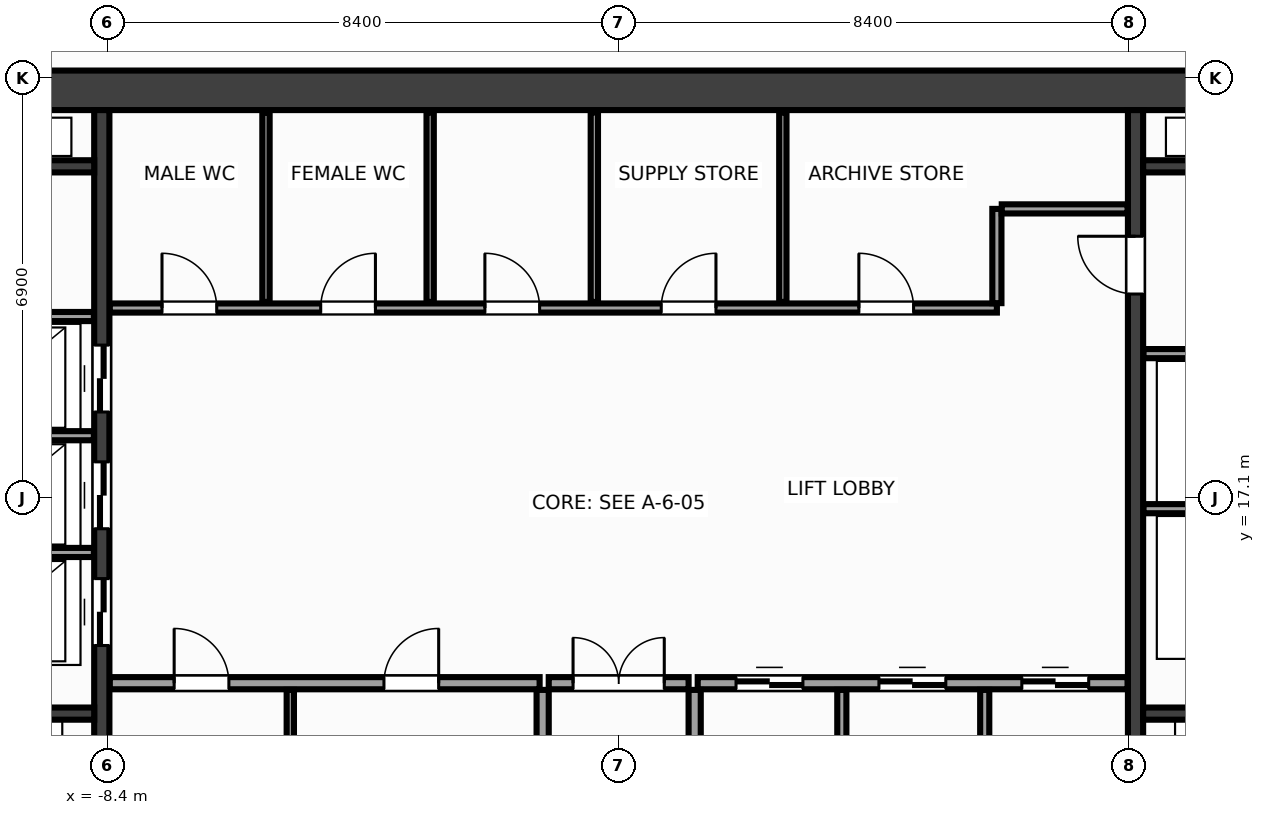
"""IFC4 building model, lengths in metres.
Left out: names, types, materials, properties, quantities, classifications, styles, units other than length and angle.
Written with IfcOpenShell. Run it as: python <this file> out.ifc"""

import sys

from ifc_helpers import new_model, si_unit, direction, frame, frame_2d, origin, place, context, subcontext, project, spatial, rectangle, extrude, source, transform, mapped, element, fill, save


model = new_model("IFC4")
c1 = context("Model", 3, precision=1e-05, world=origin(), true_north=direction((0.0, 1.0)))
c2 = subcontext(c1, "Body", "Model", "MODEL_VIEW")
j1 = project(units=[si_unit("LENGTHUNIT", "METRE"), si_unit("PLANEANGLEUNIT", "RADIAN")], contexts=[c1])
p1 = place(None, origin())
s1 = spatial("IfcSite", under=j1, at=p1, CompositionType="ELEMENT")
p2 = place(p1, origin())
s2 = spatial("IfcBuilding", under=s1, at=p2, CompositionType="ELEMENT")
p3 = place(p2, frame((0.0, 0.0, 135.2)))
s3 = spatial("IfcBuildingStorey", under=s2, at=p3, CompositionType="ELEMENT", Elevation=135.2)
m1 = source(origin(), c2, "Body", "SweptSolid", [
    extrude(rectangle(XDim=31.85, YDim=0.65, at=frame_2d((15.925, 0.0))), origin(), (0.0, 0.0, 1.0), 3.6),
])
p4 = place(p3, frame((-15.925, 23.8, 0.0), z_axis=(0.0, 0.0, 1.0), x_axis=(1.0, 0.0, 0.0)))
e1 = element("IfcWall", 1, at=p4, inside=s3, PredefinedType="SHEAR", context=c2, shape_type="MappedRepresentation", body=[
    mapped(m1, transform((0.0, 0.0, 0.0), x_axis=(1.0, 0.0, 0.0), y_axis=(0.0, 1.0, 0.0), z_axis=(0.0, 0.0, 1.0), scale=1.0)),
])
m2 = source(origin(), c2, "Body", "SweptSolid", [
    extrude(rectangle(XDim=12.95, YDim=0.25, at=frame_2d((6.475, 0.0))), origin(), (0.0, 0.0, 1.0), 3.6),
])
p5 = place(p3, frame((-8.5, 10.525, 0.0), z_axis=(0.0, 0.0, 1.0), x_axis=(0.0, 1.0, 0.0)))
e2 = element("IfcWall", 2, at=p5, inside=s3, PredefinedType="SHEAR", context=c2, shape_type="MappedRepresentation", body=[
    mapped(m2, transform((0.0, 0.0, 0.0), x_axis=(1.0, 0.0, 0.0), y_axis=(0.0, 1.0, 0.0), z_axis=(0.0, 0.0, 1.0), scale=1.0)),
])
p6 = place(p5, frame((4.145, 0.0, 0.0)))
e3 = element("IfcOpeningElement", 3, at=p6, cuts=e2, PredefinedType="OPENING", context=c2, shape_type="SweptSolid", body=[
    extrude(rectangle(XDim=1.1, YDim=2.15, at=frame_2d((0.55, 1.075))), frame((0.0, 0.137, 0.0), z_axis=(0.0, -1.0, 0.0), x_axis=(1.0, 0.0, 0.0)), (0.0, 0.0, 1.0), 0.274),
])
p7 = place(p5, frame((6.065, 0.0, 0.0)))
e4 = element("IfcOpeningElement", 4, at=p7, cuts=e2, PredefinedType="OPENING", context=c2, shape_type="SweptSolid", body=[
    extrude(rectangle(XDim=1.1, YDim=2.15, at=frame_2d((0.55, 1.075))), frame((0.0, 0.137, 0.0), z_axis=(0.0, -1.0, 0.0), x_axis=(1.0, 0.0, 0.0)), (0.0, 0.0, 1.0), 0.274),
])
p8 = place(p5, frame((7.985, 0.0, 0.0)))
e5 = element("IfcOpeningElement", 5, at=p8, cuts=e2, PredefinedType="OPENING", context=c2, shape_type="SweptSolid", body=[
    extrude(rectangle(XDim=1.1, YDim=2.15, at=frame_2d((0.55, 1.075))), frame((0.0, 0.137, 0.0), z_axis=(0.0, -1.0, 0.0), x_axis=(1.0, 0.0, 0.0)), (0.0, 0.0, 1.0), 0.274),
])
p9 = place(p3, frame((8.5, 10.525, 0.0), z_axis=(0.0, 0.0, 1.0), x_axis=(0.0, 1.0, 0.0)))
e6 = element("IfcWall", 6, at=p9, inside=s3, PredefinedType="SHEAR", context=c2, shape_type="MappedRepresentation", body=[
    mapped(m2, transform((0.0, 0.0, 0.0), x_axis=(1.0, 0.0, 0.0), y_axis=(0.0, 1.0, 0.0), z_axis=(0.0, 0.0, 1.0), scale=1.0)),
])
p10 = place(p9, frame((9.925, 0.0, 0.0)))
e7 = element("IfcOpeningElement", 7, at=p10, cuts=e6, PredefinedType="OPENING", context=c2, shape_type="SweptSolid", body=[
    extrude(rectangle(XDim=0.95, YDim=2.15, at=frame_2d((0.475, 1.075))), frame((0.0, 0.137, 0.0), z_axis=(0.0, -1.0, 0.0), x_axis=(1.0, 0.0, 0.0)), (0.0, 0.0, 1.0), 0.274),
])
m3 = source(origin(), c2, "Body", "SweptSolid", [
    extrude(rectangle(XDim=2.825, YDim=0.2, at=frame_2d((1.413, 0.0))), origin(), (0.0, 0.0, 1.0), 3.6),
])
for number, where, z_axis, x_axis in (
    (8, (-11.45, 13.55, 0.0), (0.0, 0.0, 1.0), (1.0, 0.0, 0.0)),
    (9, (8.625, 13.55, 0.0), (0.0, 0.0, 1.0), (1.0, 0.0, 0.0)),
):
    element("IfcWall", number, at=place(p3, frame(where, z_axis=z_axis, x_axis=x_axis)), inside=s3, PredefinedType="SHEAR", context=c2, shape_type="MappedRepresentation", body=[
        mapped(m3, transform((0.0, 0.0, 0.0), x_axis=(1.0, 0.0, 0.0), y_axis=(0.0, 1.0, 0.0), z_axis=(0.0, 0.0, 1.0), scale=1.0)),
    ])
m4 = source(origin(), c2, "Body", "SweptSolid", [
    extrude(rectangle(XDim=3.02, YDim=0.2, at=frame_2d((1.51, 0.0))), origin(), (0.0, 0.0, 1.0), 3.6),
])
for number, where, z_axis, x_axis in (
    (10, (-11.645, 22.55, 0.0), (0.0, 0.0, 1.0), (1.0, 0.0, 0.0)),
    (11, (8.625, 22.55, 0.0), (0.0, 0.0, 1.0), (1.0, 0.0, 0.0)),
):
    element("IfcWall", number, at=place(p3, frame(where, z_axis=z_axis, x_axis=x_axis)), inside=s3, PredefinedType="SHEAR", context=c2, shape_type="MappedRepresentation", body=[
        mapped(m4, transform((0.0, 0.0, 0.0), x_axis=(1.0, 0.0, 0.0), y_axis=(0.0, 1.0, 0.0), z_axis=(0.0, 0.0, 1.0), scale=1.0)),
    ])
m5 = source(origin(), c2, "Body", "SweptSolid", [
    extrude(rectangle(XDim=3.01, YDim=0.15, at=frame_2d((1.505, 0.0))), origin(), (0.0, 0.0, 1.0), 3.38),
])
for number, where, z_axis, x_axis in (
    (12, (-11.64, 16.2, 0.0), (0.0, 0.0, 1.0), (1.0, 0.0, 0.0)),
    (13, (-11.64, 18.12, 0.0), (0.0, 0.0, 1.0), (1.0, 0.0, 0.0)),
    (14, (-11.64, 20.08, 0.0), (0.0, 0.0, 1.0), (1.0, 0.0, 0.0)),
    (15, (8.63, 16.92, 0.0), (0.0, 0.0, 1.0), (1.0, 0.0, 0.0)),
    (16, (8.63, 19.47, 0.0), (0.0, 0.0, 1.0), (1.0, 0.0, 0.0)),
):
    element("IfcWall", number, at=place(p3, frame(where, z_axis=z_axis, x_axis=x_axis)), inside=s3, PredefinedType="PARTITIONING", context=c2, shape_type="MappedRepresentation", body=[
        mapped(m5, transform((0.0, 0.0, 0.0), x_axis=(1.0, 0.0, 0.0), y_axis=(0.0, 1.0, 0.0), z_axis=(0.0, 0.0, 1.0), scale=1.0)),
    ])
m6 = source(origin(), c2, "Body", "SweptSolid", [
    extrude(rectangle(XDim=7.07, YDim=0.2, at=frame_2d((3.535, 0.0))), origin(), (0.0, 0.0, 1.0), 3.38),
])
p11 = place(p3, frame((-8.37, 14.05, 0.0), z_axis=(0.0, 0.0, 1.0), x_axis=(1.0, 0.0, 0.0)))
e17 = element("IfcWall", 17, at=p11, inside=s3, PredefinedType="PARTITIONING", context=c2, shape_type="MappedRepresentation", body=[
    mapped(m6, transform((0.0, 0.0, 0.0), x_axis=(1.0, 0.0, 0.0), y_axis=(0.0, 1.0, 0.0), z_axis=(0.0, 0.0, 1.0), scale=1.0)),
])
p12 = place(p11, frame((1.06, 0.0, 0.0)))
e18 = element("IfcOpeningElement", 18, at=p12, cuts=e17, PredefinedType="OPENING", context=c2, shape_type="SweptSolid", body=[
    extrude(rectangle(XDim=0.9, YDim=2.15, at=frame_2d((0.45, 1.075))), frame((0.0, 0.112, 0.0), z_axis=(0.0, -1.0, 0.0), x_axis=(1.0, 0.0, 0.0)), (0.0, 0.0, 1.0), 0.224),
])
p13 = place(p11, frame((4.51, 0.0, 0.0)))
e19 = element("IfcOpeningElement", 19, at=p13, cuts=e17, PredefinedType="OPENING", context=c2, shape_type="SweptSolid", body=[
    extrude(rectangle(XDim=0.9, YDim=2.15, at=frame_2d((0.45, 1.075))), frame((0.0, 0.112, 0.0), z_axis=(0.0, -1.0, 0.0), x_axis=(1.0, 0.0, 0.0)), (0.0, 0.0, 1.0), 0.224),
])
p14 = place(p3, frame((1.3, 14.05, 0.0), z_axis=(0.0, 0.0, 1.0), x_axis=(1.0, 0.0, 0.0)))
e20 = element("IfcWall", 20, at=p14, inside=s3, PredefinedType="PARTITIONING", context=c2, shape_type="MappedRepresentation", body=[
    mapped(m6, transform((0.0, 0.0, 0.0), x_axis=(1.0, 0.0, 0.0), y_axis=(0.0, 1.0, 0.0), z_axis=(0.0, 0.0, 1.0), scale=1.0)),
])
p15 = place(p14, frame((0.63, 0.0, 0.0)))
e21 = element("IfcOpeningElement", 21, at=p15, cuts=e20, PredefinedType="OPENING", context=c2, shape_type="SweptSolid", body=[
    extrude(rectangle(XDim=1.1, YDim=2.15, at=frame_2d((0.55, 1.075))), frame((0.0, 0.112, 0.0), z_axis=(0.0, -1.0, 0.0), x_axis=(1.0, 0.0, 0.0)), (0.0, 0.0, 1.0), 0.224),
])
p16 = place(p14, frame((2.98, 0.0, 0.0)))
e22 = element("IfcOpeningElement", 22, at=p16, cuts=e20, PredefinedType="OPENING", context=c2, shape_type="SweptSolid", body=[
    extrude(rectangle(XDim=1.1, YDim=2.15, at=frame_2d((0.55, 1.075))), frame((0.0, 0.112, 0.0), z_axis=(0.0, -1.0, 0.0), x_axis=(1.0, 0.0, 0.0)), (0.0, 0.0, 1.0), 0.224),
])
p17 = place(p14, frame((5.33, 0.0, 0.0)))
e23 = element("IfcOpeningElement", 23, at=p17, cuts=e20, PredefinedType="OPENING", context=c2, shape_type="SweptSolid", body=[
    extrude(rectangle(XDim=1.1, YDim=2.15, at=frame_2d((0.55, 1.075))), frame((0.0, 0.112, 0.0), z_axis=(0.0, -1.0, 0.0), x_axis=(1.0, 0.0, 0.0)), (0.0, 0.0, 1.0), 0.224),
])
m7 = source(origin(), c2, "Body", "SweptSolid", [
    extrude(rectangle(XDim=3.415, YDim=0.2, at=frame_2d((1.708, 0.0))), origin(), (0.0, 0.0, 1.0), 3.38),
])
for number, where, z_axis, x_axis in (
    (24, (-1.25, 10.525, 0.0), (0.0, 0.0, 1.0), (0.0, 1.0, 0.0)),
    (25, (1.25, 10.525, 0.0), (0.0, 0.0, 1.0), (0.0, 1.0, 0.0)),
):
    element("IfcWall", number, at=place(p3, frame(where, z_axis=z_axis, x_axis=x_axis)), inside=s3, PredefinedType="PARTITIONING", context=c2, shape_type="MappedRepresentation", body=[
        mapped(m7, transform((0.0, 0.0, 0.0), x_axis=(1.0, 0.0, 0.0), y_axis=(0.0, 1.0, 0.0), z_axis=(0.0, 0.0, 1.0), scale=1.0)),
    ])
m8 = source(origin(), c2, "Body", "SweptSolid", [
    extrude(rectangle(XDim=2.3, YDim=0.2, at=frame_2d((1.15, 0.0))), origin(), (0.0, 0.0, 1.0), 3.38),
])
p18 = place(p3, frame((-1.15, 14.05, 0.0), z_axis=(0.0, 0.0, 1.0), x_axis=(1.0, 0.0, 0.0)))
e26 = element("IfcWall", 26, at=p18, inside=s3, PredefinedType="PARTITIONING", context=c2, shape_type="MappedRepresentation", body=[
    mapped(m8, transform((0.0, 0.0, 0.0), x_axis=(1.0, 0.0, 0.0), y_axis=(0.0, 1.0, 0.0), z_axis=(0.0, 0.0, 1.0), scale=1.0)),
])
p19 = place(p18, frame((0.4, 0.0, 0.0)))
e27 = element("IfcOpeningElement", 27, at=p19, cuts=e26, PredefinedType="OPENING", context=c2, shape_type="SweptSolid", body=[
    extrude(rectangle(XDim=1.5, YDim=2.2, at=frame_2d((0.75, 1.1))), frame((0.0, 0.112, 0.0), z_axis=(0.0, -1.0, 0.0), x_axis=(1.0, 0.0, 0.0)), (0.0, 0.0, 1.0), 0.224),
])
m9 = source(origin(), c2, "Body", "SweptSolid", [
    extrude(rectangle(XDim=14.59, YDim=0.15, at=frame_2d((7.295, 0.0))), origin(), (0.0, 0.0, 1.0), 3.38),
])
p20 = place(p3, frame((-8.37, 20.22, 0.0), z_axis=(0.0, 0.0, 1.0), x_axis=(1.0, 0.0, 0.0)))
e28 = element("IfcWall", 28, at=p20, inside=s3, PredefinedType="PARTITIONING", context=c2, shape_type="MappedRepresentation", body=[
    mapped(m9, transform((0.0, 0.0, 0.0), x_axis=(1.0, 0.0, 0.0), y_axis=(0.0, 1.0, 0.0), z_axis=(0.0, 0.0, 1.0), scale=1.0)),
])
p21 = place(p20, frame((0.86, 0.0, 0.0)))
e29 = element("IfcOpeningElement", 29, at=p21, cuts=e28, PredefinedType="OPENING", context=c2, shape_type="SweptSolid", body=[
    extrude(rectangle(XDim=0.9, YDim=2.15, at=frame_2d((0.45, 1.075))), frame((0.0, 0.087, 0.0), z_axis=(0.0, -1.0, 0.0), x_axis=(1.0, 0.0, 0.0)), (0.0, 0.0, 1.0), 0.174),
])
p22 = place(p20, frame((3.47, 0.0, 0.0)))
e30 = element("IfcOpeningElement", 30, at=p22, cuts=e28, PredefinedType="OPENING", context=c2, shape_type="SweptSolid", body=[
    extrude(rectangle(XDim=0.9, YDim=2.15, at=frame_2d((0.45, 1.075))), frame((0.0, 0.087, 0.0), z_axis=(0.0, -1.0, 0.0), x_axis=(1.0, 0.0, 0.0)), (0.0, 0.0, 1.0), 0.174),
])
p23 = place(p20, frame((6.17, 0.0, 0.0)))
e31 = element("IfcOpeningElement", 31, at=p23, cuts=e28, PredefinedType="OPENING", context=c2, shape_type="SweptSolid", body=[
    extrude(rectangle(XDim=0.9, YDim=2.15, at=frame_2d((0.45, 1.075))), frame((0.0, 0.087, 0.0), z_axis=(0.0, -1.0, 0.0), x_axis=(1.0, 0.0, 0.0)), (0.0, 0.0, 1.0), 0.174),
])
p24 = place(p20, frame((9.07, 0.0, 0.0)))
e32 = element("IfcOpeningElement", 32, at=p24, cuts=e28, PredefinedType="OPENING", context=c2, shape_type="SweptSolid", body=[
    extrude(rectangle(XDim=0.9, YDim=2.15, at=frame_2d((0.45, 1.075))), frame((0.0, 0.087, 0.0), z_axis=(0.0, -1.0, 0.0), x_axis=(1.0, 0.0, 0.0)), (0.0, 0.0, 1.0), 0.174),
])
p25 = place(p20, frame((12.32, 0.0, 0.0)))
e33 = element("IfcOpeningElement", 33, at=p25, cuts=e28, PredefinedType="OPENING", context=c2, shape_type="SweptSolid", body=[
    extrude(rectangle(XDim=0.9, YDim=2.15, at=frame_2d((0.45, 1.075))), frame((0.0, 0.087, 0.0), z_axis=(0.0, -1.0, 0.0), x_axis=(1.0, 0.0, 0.0)), (0.0, 0.0, 1.0), 0.174),
])
m10 = source(origin(), c2, "Body", "SweptSolid", [
    extrude(rectangle(XDim=1.55, YDim=0.15, at=frame_2d((0.775, 0.0))), origin(), (0.0, 0.0, 1.0), 3.38),
])
p26 = place(p3, frame((6.22, 20.3, 0.0), z_axis=(0.0, 0.0, 1.0), x_axis=(0.0, 1.0, 0.0)))
e34 = element("IfcWall", 34, at=p26, inside=s3, PredefinedType="PARTITIONING", context=c2, shape_type="MappedRepresentation", body=[
    mapped(m10, transform((0.0, 0.0, 0.0), x_axis=(1.0, 0.0, 0.0), y_axis=(0.0, 1.0, 0.0), z_axis=(0.0, 0.0, 1.0), scale=1.0)),
])
m11 = source(origin(), c2, "Body", "SweptSolid", [
    extrude(rectangle(XDim=2.07, YDim=0.15, at=frame_2d((1.035, 0.0))), origin(), (0.0, 0.0, 1.0), 3.38),
])
p27 = place(p3, frame((6.3, 21.85, 0.0), z_axis=(0.0, 0.0, 1.0), x_axis=(1.0, 0.0, 0.0)))
e35 = element("IfcWall", 35, at=p27, inside=s3, PredefinedType="PARTITIONING", context=c2, shape_type="MappedRepresentation", body=[
    mapped(m11, transform((0.0, 0.0, 0.0), x_axis=(1.0, 0.0, 0.0), y_axis=(0.0, 1.0, 0.0), z_axis=(0.0, 0.0, 1.0), scale=1.0)),
])
m12 = source(origin(), c2, "Body", "SweptSolid", [
    extrude(rectangle(XDim=3.415, YDim=0.12, at=frame_2d((1.708, 0.0))), origin(), (0.0, 0.0, 1.0), 3.38),
])
p28 = place(p3, frame((-5.4, 10.525, 0.0), z_axis=(0.0, 0.0, 1.0), x_axis=(0.0, 1.0, 0.0)))
e36 = element("IfcWall", 36, at=p28, inside=s3, PredefinedType="PARTITIONING", context=c2, shape_type="MappedRepresentation", body=[
    mapped(m12, transform((0.0, 0.0, 0.0), x_axis=(1.0, 0.0, 0.0), y_axis=(0.0, 1.0, 0.0), z_axis=(0.0, 0.0, 1.0), scale=1.0)),
])
m13 = source(origin(), c2, "Body", "SweptSolid", [
    extrude(rectangle(XDim=3.415, YDim=0.15, at=frame_2d((1.708, 0.0))), origin(), (0.0, 0.0, 1.0), 3.38),
])
for number, where, z_axis, x_axis in (
    (37, (3.67, 10.525, 0.0), (0.0, 0.0, 1.0), (0.0, 1.0, 0.0)),
    (38, (6.02, 10.525, 0.0), (0.0, 0.0, 1.0), (0.0, 1.0, 0.0)),
):
    element("IfcWall", number, at=place(p3, frame(where, z_axis=z_axis, x_axis=x_axis)), inside=s3, PredefinedType="PARTITIONING", context=c2, shape_type="MappedRepresentation", body=[
        mapped(m13, transform((0.0, 0.0, 0.0), x_axis=(1.0, 0.0, 0.0), y_axis=(0.0, 1.0, 0.0), z_axis=(0.0, 0.0, 1.0), scale=1.0)),
    ])
m14 = source(origin(), c2, "Body", "SweptSolid", [
    extrude(rectangle(XDim=3.115, YDim=0.12, at=frame_2d((1.558, 0.0))), origin(), (0.0, 0.0, 1.0), 3.38),
])
for number, where, z_axis, x_axis in (
    (39, (-5.8, 20.32, 0.0), (0.0, 0.0, 1.0), (0.0, 1.0, 0.0)),
    (40, (-3.1, 20.32, 0.0), (0.0, 0.0, 1.0), (0.0, 1.0, 0.0)),
    (41, (-0.4, 20.32, 0.0), (0.0, 0.0, 1.0), (0.0, 1.0, 0.0)),
    (42, (2.7, 20.32, 0.0), (0.0, 0.0, 1.0), (0.0, 1.0, 0.0)),
):
    element("IfcWall", number, at=place(p3, frame(where, z_axis=z_axis, x_axis=x_axis)), inside=s3, PredefinedType="PARTITIONING", context=c2, shape_type="MappedRepresentation", body=[
        mapped(m14, transform((0.0, 0.0, 0.0), x_axis=(1.0, 0.0, 0.0), y_axis=(0.0, 1.0, 0.0), z_axis=(0.0, 0.0, 1.0), scale=1.0)),
    ])
m15 = source(origin(), c2, "Body", "SweptSolid", [
    extrude(rectangle(XDim=1.1, YDim=2.15, at=frame_2d((0.55, 1.075))), frame((0.0, 0.025, 0.0), z_axis=(0.0, -1.0, 0.0), x_axis=(1.0, 0.0, 0.0)), (0.0, 0.0, 1.0), 0.05),
])
p29 = place(p6, origin())
e43 = element("IfcDoor", 43, at=p29, inside=s3, OperationType="DOUBLE_DOOR_SLIDING", PredefinedType="DOOR", context=c2, shape_type="MappedRepresentation", body=[
    mapped(m15, transform((0.0, 0.0, 0.0), x_axis=(1.0, 0.0, 0.0), y_axis=(0.0, 1.0, 0.0), z_axis=(0.0, 0.0, 1.0), scale=1.0)),
])
fill(e3, e43)
p30 = place(p7, origin())
e44 = element("IfcDoor", 44, at=p30, inside=s3, OperationType="DOUBLE_DOOR_SLIDING", PredefinedType="DOOR", context=c2, shape_type="MappedRepresentation", body=[
    mapped(m15, transform((0.0, 0.0, 0.0), x_axis=(1.0, 0.0, 0.0), y_axis=(0.0, 1.0, 0.0), z_axis=(0.0, 0.0, 1.0), scale=1.0)),
])
fill(e4, e44)
p31 = place(p8, origin())
e45 = element("IfcDoor", 45, at=p31, inside=s3, OperationType="DOUBLE_DOOR_SLIDING", PredefinedType="DOOR", context=c2, shape_type="MappedRepresentation", body=[
    mapped(m15, transform((0.0, 0.0, 0.0), x_axis=(1.0, 0.0, 0.0), y_axis=(0.0, 1.0, 0.0), z_axis=(0.0, 0.0, 1.0), scale=1.0)),
])
fill(e5, e45)
m16 = source(origin(), c2, "Body", "SweptSolid", [
    extrude(rectangle(XDim=0.95, YDim=2.15, at=frame_2d((0.475, 1.075))), frame((0.0, 0.025, 0.0), z_axis=(0.0, -1.0, 0.0), x_axis=(1.0, 0.0, 0.0)), (0.0, 0.0, 1.0), 0.05),
])
p32 = place(p10, origin())
e46 = element("IfcDoor", 46, at=p32, inside=s3, OperationType="SINGLE_SWING_RIGHT", PredefinedType="DOOR", context=c2, shape_type="MappedRepresentation", body=[
    mapped(m16, transform((0.0, 0.0, 0.0), x_axis=(1.0, 0.0, 0.0), y_axis=(0.0, 1.0, 0.0), z_axis=(0.0, 0.0, 1.0), scale=1.0)),
])
fill(e7, e46)
m17 = source(origin(), c2, "Body", "SweptSolid", [
    extrude(rectangle(XDim=0.9, YDim=2.15, at=frame_2d((0.45, 1.075))), frame((0.0, 0.025, 0.0), z_axis=(0.0, -1.0, 0.0), x_axis=(1.0, 0.0, 0.0)), (0.0, 0.0, 1.0), 0.05),
])
p33 = place(p12, origin())
e47 = element("IfcDoor", 47, at=p33, inside=s3, OperationType="SINGLE_SWING_LEFT", PredefinedType="DOOR", context=c2, shape_type="MappedRepresentation", body=[
    mapped(m17, transform((0.0, 0.0, 0.0), x_axis=(1.0, 0.0, 0.0), y_axis=(0.0, 1.0, 0.0), z_axis=(0.0, 0.0, 1.0), scale=1.0)),
])
fill(e18, e47)
p34 = place(p13, origin())
e48 = element("IfcDoor", 48, at=p34, inside=s3, OperationType="SINGLE_SWING_RIGHT", PredefinedType="DOOR", context=c2, shape_type="MappedRepresentation", body=[
    mapped(m17, transform((0.0, 0.0, 0.0), x_axis=(1.0, 0.0, 0.0), y_axis=(0.0, 1.0, 0.0), z_axis=(0.0, 0.0, 1.0), scale=1.0)),
])
fill(e19, e48)
p35 = place(p15, origin())
e49 = element("IfcDoor", 49, at=p35, inside=s3, OperationType="DOUBLE_DOOR_SLIDING", PredefinedType="DOOR", context=c2, shape_type="MappedRepresentation", body=[
    mapped(m15, transform((0.0, 0.0, 0.0), x_axis=(1.0, 0.0, 0.0), y_axis=(0.0, 1.0, 0.0), z_axis=(0.0, 0.0, 1.0), scale=1.0)),
])
fill(e21, e49)
p36 = place(p16, origin())
e50 = element("IfcDoor", 50, at=p36, inside=s3, OperationType="DOUBLE_DOOR_SLIDING", PredefinedType="DOOR", context=c2, shape_type="MappedRepresentation", body=[
    mapped(m15, transform((0.0, 0.0, 0.0), x_axis=(1.0, 0.0, 0.0), y_axis=(0.0, 1.0, 0.0), z_axis=(0.0, 0.0, 1.0), scale=1.0)),
])
fill(e22, e50)
p37 = place(p17, origin())
e51 = element("IfcDoor", 51, at=p37, inside=s3, OperationType="DOUBLE_DOOR_SLIDING", PredefinedType="DOOR", context=c2, shape_type="MappedRepresentation", body=[
    mapped(m15, transform((0.0, 0.0, 0.0), x_axis=(1.0, 0.0, 0.0), y_axis=(0.0, 1.0, 0.0), z_axis=(0.0, 0.0, 1.0), scale=1.0)),
])
fill(e23, e51)
m18 = source(origin(), c2, "Body", "SweptSolid", [
    extrude(rectangle(XDim=1.5, YDim=2.2, at=frame_2d((0.75, 1.1))), frame((0.0, 0.025, 0.0), z_axis=(0.0, -1.0, 0.0), x_axis=(1.0, 0.0, 0.0)), (0.0, 0.0, 1.0), 0.05),
])
p38 = place(p19, origin())
e52 = element("IfcDoor", 52, at=p38, inside=s3, OperationType="DOUBLE_DOOR_SINGLE_SWING", PredefinedType="DOOR", context=c2, shape_type="MappedRepresentation", body=[
    mapped(m18, transform((0.0, 0.0, 0.0), x_axis=(1.0, 0.0, 0.0), y_axis=(0.0, 1.0, 0.0), z_axis=(0.0, 0.0, 1.0), scale=1.0)),
])
fill(e27, e52)
p39 = place(p21, origin())
e53 = element("IfcDoor", 53, at=p39, inside=s3, OperationType="SINGLE_SWING_LEFT", PredefinedType="DOOR", context=c2, shape_type="MappedRepresentation", body=[
    mapped(m17, transform((0.0, 0.0, 0.0), x_axis=(1.0, 0.0, 0.0), y_axis=(0.0, 1.0, 0.0), z_axis=(0.0, 0.0, 1.0), scale=1.0)),
])
fill(e29, e53)
p40 = place(p22, origin())
e54 = element("IfcDoor", 54, at=p40, inside=s3, OperationType="SINGLE_SWING_RIGHT", PredefinedType="DOOR", context=c2, shape_type="MappedRepresentation", body=[
    mapped(m17, transform((0.0, 0.0, 0.0), x_axis=(1.0, 0.0, 0.0), y_axis=(0.0, 1.0, 0.0), z_axis=(0.0, 0.0, 1.0), scale=1.0)),
])
fill(e30, e54)
p41 = place(p23, origin())
e55 = element("IfcDoor", 55, at=p41, inside=s3, OperationType="SINGLE_SWING_LEFT", PredefinedType="DOOR", context=c2, shape_type="MappedRepresentation", body=[
    mapped(m17, transform((0.0, 0.0, 0.0), x_axis=(1.0, 0.0, 0.0), y_axis=(0.0, 1.0, 0.0), z_axis=(0.0, 0.0, 1.0), scale=1.0)),
])
fill(e31, e55)
p42 = place(p24, origin())
e56 = element("IfcDoor", 56, at=p42, inside=s3, OperationType="SINGLE_SWING_RIGHT", PredefinedType="DOOR", context=c2, shape_type="MappedRepresentation", body=[
    mapped(m17, transform((0.0, 0.0, 0.0), x_axis=(1.0, 0.0, 0.0), y_axis=(0.0, 1.0, 0.0), z_axis=(0.0, 0.0, 1.0), scale=1.0)),
])
fill(e32, e56)
p43 = place(p25, origin())
e57 = element("IfcDoor", 57, at=p43, inside=s3, OperationType="SINGLE_SWING_LEFT", PredefinedType="DOOR", context=c2, shape_type="MappedRepresentation", body=[
    mapped(m17, transform((0.0, 0.0, 0.0), x_axis=(1.0, 0.0, 0.0), y_axis=(0.0, 1.0, 0.0), z_axis=(0.0, 0.0, 1.0), scale=1.0)),
])
fill(e33, e57)
save(model, sys.argv[1])
